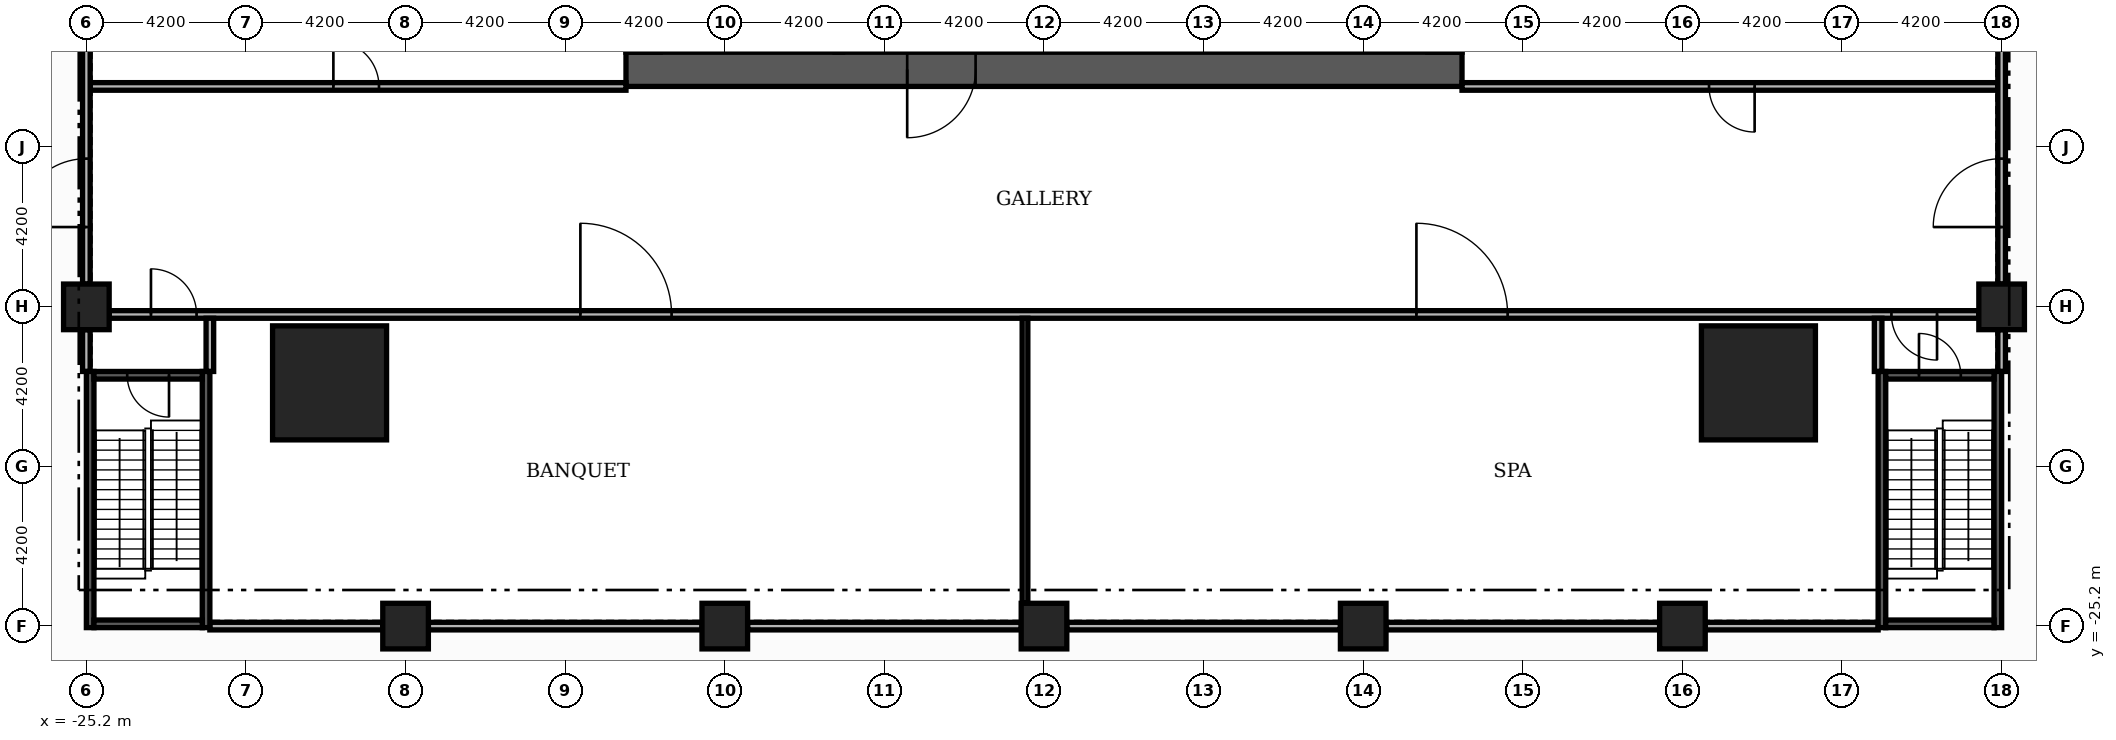
"""IFC4 building model, lengths in metres.
Left out: names, types, materials, properties, quantities, classifications, styles, units other than length and angle.
Written with IfcOpenShell. Run it as: python <this file> out.ifc"""

import sys

from ifc_helpers import new_model, si_unit, direction, frame, frame_2d, origin, origin_2d, place, context, subcontext, project, spatial, rectangle, extrude, element, fill, save


model = new_model("IFC4")
c1 = context("Model", 3, precision=1e-05, world=origin(), true_north=direction((0.0, 1.0)))
c2 = subcontext(c1, "Body", "Model", "MODEL_VIEW")
j1 = project(units=[si_unit("LENGTHUNIT", "METRE"), si_unit("PLANEANGLEUNIT", "RADIAN")], contexts=[c1])
p1 = place(None, origin())
s1 = spatial("IfcSite", under=j1, at=p1, CompositionType="ELEMENT")
p2 = place(p1, origin())
s2 = spatial("IfcBuilding", under=s1, at=p2, CompositionType="ELEMENT")
p3 = place(p2, frame((0.0, 0.0, 16.8)))
s3 = spatial("IfcBuildingStorey", under=s2, at=p3, CompositionType="ELEMENT", Elevation=16.8)
p4 = place(p3, frame((-11.0, -10.55, 0.0), z_axis=(0.0, 0.0, 1.0), x_axis=(1.0, 0.0, 0.0)))
e1 = element("IfcWall", 1, at=p4, inside=s3, PredefinedType="SHEAR", context=c2, shape_type="SweptSolid", body=[
    extrude(rectangle(XDim=22.0, YDim=0.9, at=frame_2d((11.0, 0.0))), origin(), (0.0, 0.0, 1.0), 4.98),
])
p5 = place(p4, frame((7.4, 0.0, 0.0)))
e2 = element("IfcOpeningElement", 2, at=p5, cuts=e1, PredefinedType="OPENING", context=c2, shape_type="SweptSolid", body=[
    extrude(rectangle(XDim=1.8, YDim=2.2, at=frame_2d((0.9, 1.1))), frame((0.0, 0.46, 0.0), z_axis=(0.0, -1.0, 0.0), x_axis=(1.0, 0.0, 0.0)), (0.0, 0.0, 1.0), 0.92),
])
for number, where, z_axis, x_axis in (
    (3, (18.8, -18.8, 0.0), (0.0, 0.0, 1.0), (1.0, 0.0, 0.0)),
    (4, (-18.8, -18.8, 0.0), (0.0, 0.0, 1.0), (1.0, 0.0, 0.0)),
):
    element("IfcColumn", number, at=place(p3, frame(where, z_axis=z_axis, x_axis=x_axis)), inside=s3, PredefinedType="COLUMN", context=c2, shape_type="SweptSolid", body=[
        extrude(rectangle(XDim=3.0, YDim=3.0, at=origin_2d()), origin(), (0.0, 0.0, 1.0), 5.4),
    ])
for number, where, z_axis, x_axis in (
    (5, (25.2, -16.8, 0.0), (0.0, 0.0, 1.0), (1.0, 0.0, 0.0)),
    (6, (0.0, -25.2, 0.0), (0.0, 0.0, 1.0), (1.0, 0.0, 0.0)),
    (7, (8.4, -25.2, 0.0), (0.0, 0.0, 1.0), (1.0, 0.0, 0.0)),
    (8, (16.8, -25.2, 0.0), (0.0, 0.0, 1.0), (1.0, 0.0, 0.0)),
    (9, (-8.4, -25.2, 0.0), (0.0, 0.0, 1.0), (1.0, 0.0, 0.0)),
    (10, (-16.8, -25.2, 0.0), (0.0, 0.0, 1.0), (1.0, 0.0, 0.0)),
    (11, (-25.2, -16.8, 0.0), (0.0, 0.0, 1.0), (1.0, 0.0, 0.0)),
):
    element("IfcColumn", number, at=place(p3, frame(where, z_axis=z_axis, x_axis=x_axis)), inside=s3, PredefinedType="COLUMN", context=c2, shape_type="SweptSolid", body=[
        extrude(rectangle(XDim=1.2, YDim=1.2, at=origin_2d()), origin(), (0.0, 0.0, 1.0), 5.4),
    ])
p6 = place(p3, frame((-21.95, -25.2, 0.0), z_axis=(0.0, 0.0, 1.0), x_axis=(1.0, 0.0, 0.0)))
e12 = element("IfcWall", 12, at=p6, inside=s3, PredefinedType="PARTITIONING", context=c2, shape_type="SweptSolid", body=[
    extrude(rectangle(XDim=4.55, YDim=0.2, at=frame_2d((2.275, 0.0))), origin(), (0.0, 0.0, 1.0), 4.78),
])
for number, where, z_axis, x_axis in (
    (13, (-16.2, -25.2, 0.0), (0.0, 0.0, 1.0), (1.0, 0.0, 0.0)),
    (14, (-7.8, -25.2, 0.0), (0.0, 0.0, 1.0), (1.0, 0.0, 0.0)),
    (15, (0.6, -25.2, 0.0), (0.0, 0.0, 1.0), (1.0, 0.0, 0.0)),
    (16, (9.0, -25.2, 0.0), (0.0, 0.0, 1.0), (1.0, 0.0, 0.0)),
):
    element("IfcWall", number, at=place(p3, frame(where, z_axis=z_axis, x_axis=x_axis)), inside=s3, PredefinedType="PARTITIONING", context=c2, shape_type="SweptSolid", body=[
        extrude(rectangle(XDim=7.2, YDim=0.2, at=frame_2d((3.6, 0.0))), origin(), (0.0, 0.0, 1.0), 4.78),
    ])
p7 = place(p3, frame((17.4, -25.2, 0.0), z_axis=(0.0, 0.0, 1.0), x_axis=(1.0, 0.0, 0.0)))
e17 = element("IfcWall", 17, at=p7, inside=s3, PredefinedType="PARTITIONING", context=c2, shape_type="SweptSolid", body=[
    extrude(rectangle(XDim=4.55, YDim=0.2, at=frame_2d((2.275, 0.0))), origin(), (0.0, 0.0, 1.0), 4.78),
])
p8 = place(p3, frame((-24.6, -17.0, 0.0), z_axis=(0.0, 0.0, 1.0), x_axis=(1.0, 0.0, 0.0)))
e18 = element("IfcWall", 18, at=p8, inside=s3, PredefinedType="PARTITIONING", context=c2, shape_type="SweptSolid", body=[
    extrude(rectangle(XDim=49.2, YDim=0.2, at=frame_2d((24.6, 0.0))), origin(), (0.0, 0.0, 1.0), 4.98),
])
p9 = place(p8, frame((1.1, 0.0, 0.0)))
e19 = element("IfcOpeningElement", 19, at=p9, cuts=e18, PredefinedType="OPENING", context=c2, shape_type="SweptSolid", body=[
    extrude(rectangle(XDim=1.2, YDim=2.2, at=frame_2d((0.6, 1.1))), frame((0.0, 0.11, 0.0), z_axis=(0.0, -1.0, 0.0), x_axis=(1.0, 0.0, 0.0)), (0.0, 0.0, 1.0), 0.22),
])
p10 = place(p8, frame((12.4, 0.0, 0.0)))
e20 = element("IfcOpeningElement", 20, at=p10, cuts=e18, PredefinedType="OPENING", context=c2, shape_type="SweptSolid", body=[
    extrude(rectangle(XDim=2.4, YDim=2.4, at=frame_2d((1.2, 1.2))), frame((0.0, 0.11, 0.0), z_axis=(0.0, -1.0, 0.0), x_axis=(1.0, 0.0, 0.0)), (0.0, 0.0, 1.0), 0.22),
])
p11 = place(p8, frame((34.4, 0.0, 0.0)))
e21 = element("IfcOpeningElement", 21, at=p11, cuts=e18, PredefinedType="OPENING", context=c2, shape_type="SweptSolid", body=[
    extrude(rectangle(XDim=2.4, YDim=2.4, at=frame_2d((1.2, 1.2))), frame((0.0, 0.11, 0.0), z_axis=(0.0, -1.0, 0.0), x_axis=(1.0, 0.0, 0.0)), (0.0, 0.0, 1.0), 0.22),
])
p12 = place(p8, frame((46.9, 0.0, 0.0)))
e22 = element("IfcOpeningElement", 22, at=p12, cuts=e18, PredefinedType="OPENING", context=c2, shape_type="SweptSolid", body=[
    extrude(rectangle(XDim=1.2, YDim=2.2, at=frame_2d((0.6, 1.1))), frame((0.0, 0.11, 0.0), z_axis=(0.0, -1.0, 0.0), x_axis=(1.0, 0.0, 0.0)), (0.0, 0.0, 1.0), 0.22),
])
p13 = place(p3, frame((-25.1, -11.0, 0.0), z_axis=(0.0, 0.0, 1.0), x_axis=(1.0, 0.0, 0.0)))
e23 = element("IfcWall", 23, at=p13, inside=s3, PredefinedType="PARTITIONING", context=c2, shape_type="SweptSolid", body=[
    extrude(rectangle(XDim=14.1, YDim=0.2, at=frame_2d((7.05, 0.0))), origin(), (0.0, 0.0, 1.0), 4.98),
])
p14 = place(p13, frame((6.4, 0.0, 0.0)))
e24 = element("IfcOpeningElement", 24, at=p14, cuts=e23, PredefinedType="OPENING", context=c2, shape_type="SweptSolid", body=[
    extrude(rectangle(XDim=1.2, YDim=2.2, at=frame_2d((0.6, 1.1))), frame((0.0, 0.11, 0.0), z_axis=(0.0, -1.0, 0.0), x_axis=(1.0, 0.0, 0.0)), (0.0, 0.0, 1.0), 0.22),
])
p15 = place(p3, frame((11.0, -11.0, 0.0), z_axis=(0.0, 0.0, 1.0), x_axis=(1.0, 0.0, 0.0)))
e25 = element("IfcWall", 25, at=p15, inside=s3, PredefinedType="PARTITIONING", context=c2, shape_type="SweptSolid", body=[
    extrude(rectangle(XDim=14.1, YDim=0.2, at=frame_2d((7.05, 0.0))), origin(), (0.0, 0.0, 1.0), 4.98),
])
p16 = place(p15, frame((6.5, 0.0, 0.0)))
e26 = element("IfcOpeningElement", 26, at=p16, cuts=e25, PredefinedType="OPENING", context=c2, shape_type="SweptSolid", body=[
    extrude(rectangle(XDim=1.2, YDim=2.2, at=frame_2d((0.6, 1.1))), frame((0.0, 0.11, 0.0), z_axis=(0.0, -1.0, 0.0), x_axis=(1.0, 0.0, 0.0)), (0.0, 0.0, 1.0), 0.22),
])
p17 = place(p3, frame((-25.2, -18.5, 0.0), z_axis=(0.0, 0.0, 1.0), x_axis=(0.0, 1.0, 0.0)))
e27 = element("IfcWall", 27, at=p17, inside=s3, PredefinedType="PARTITIONING", context=c2, shape_type="SweptSolid", body=[
    extrude(rectangle(XDim=1.1, YDim=0.2, at=frame_2d((0.55, 0.0))), origin(), (0.0, 0.0, 1.0), 4.68),
])
p18 = place(p3, frame((-25.2, -16.2, 0.0), z_axis=(0.0, 0.0, 1.0), x_axis=(0.0, 1.0, 0.0)))
e28 = element("IfcWall", 28, at=p18, inside=s3, PredefinedType="PARTITIONING", context=c2, shape_type="SweptSolid", body=[
    extrude(rectangle(XDim=7.2, YDim=0.2, at=frame_2d((3.6, 0.0))), origin(), (0.0, 0.0, 1.0), 4.68),
])
p19 = place(p18, frame((1.5, 0.0, 0.0)))
e29 = element("IfcOpeningElement", 29, at=p19, cuts=e28, PredefinedType="OPENING", context=c2, shape_type="SweptSolid", body=[
    extrude(rectangle(XDim=1.8, YDim=2.2, at=frame_2d((0.9, 1.1))), frame((0.0, 0.11, 0.0), z_axis=(0.0, -1.0, 0.0), x_axis=(1.0, 0.0, 0.0)), (0.0, 0.0, 1.0), 0.22),
])
p20 = place(p3, frame((-21.95, -18.5, 0.0), z_axis=(0.0, 0.0, 1.0), x_axis=(0.0, 1.0, 0.0)))
e30 = element("IfcWall", 30, at=p20, inside=s3, PredefinedType="PARTITIONING", context=c2, shape_type="SweptSolid", body=[
    extrude(rectangle(XDim=1.4, YDim=0.2, at=frame_2d((0.7, 0.0))), origin(), (0.0, 0.0, 1.0), 4.98),
])
p21 = place(p3, frame((-0.5, -24.6, 0.0), z_axis=(0.0, 0.0, 1.0), x_axis=(0.0, 1.0, 0.0)))
e31 = element("IfcWall", 31, at=p21, inside=s3, PredefinedType="PARTITIONING", context=c2, shape_type="SweptSolid", body=[
    extrude(rectangle(XDim=7.5, YDim=0.15, at=frame_2d((3.75, 0.0))), origin(), (0.0, 0.0, 1.0), 4.98),
])
p22 = place(p3, frame((21.95, -18.5, 0.0), z_axis=(0.0, 0.0, 1.0), x_axis=(0.0, 1.0, 0.0)))
e32 = element("IfcWall", 32, at=p22, inside=s3, PredefinedType="PARTITIONING", context=c2, shape_type="SweptSolid", body=[
    extrude(rectangle(XDim=1.4, YDim=0.2, at=frame_2d((0.7, 0.0))), origin(), (0.0, 0.0, 1.0), 4.98),
])
p23 = place(p3, frame((25.2, -18.5, 0.0), z_axis=(0.0, 0.0, 1.0), x_axis=(0.0, 1.0, 0.0)))
e33 = element("IfcWall", 33, at=p23, inside=s3, PredefinedType="PARTITIONING", context=c2, shape_type="SweptSolid", body=[
    extrude(rectangle(XDim=1.1, YDim=0.2, at=frame_2d((0.55, 0.0))), origin(), (0.0, 0.0, 1.0), 4.68),
])
p24 = place(p3, frame((25.2, -16.2, 0.0), z_axis=(0.0, 0.0, 1.0), x_axis=(0.0, 1.0, 0.0)))
e34 = element("IfcWall", 34, at=p24, inside=s3, PredefinedType="PARTITIONING", context=c2, shape_type="SweptSolid", body=[
    extrude(rectangle(XDim=7.2, YDim=0.2, at=frame_2d((3.6, 0.0))), origin(), (0.0, 0.0, 1.0), 4.68),
])
p25 = place(p24, frame((1.5, 0.0, 0.0)))
e35 = element("IfcOpeningElement", 35, at=p25, cuts=e34, PredefinedType="OPENING", context=c2, shape_type="SweptSolid", body=[
    extrude(rectangle(XDim=1.8, YDim=2.2, at=frame_2d((0.9, 1.1))), frame((0.0, 0.11, 0.0), z_axis=(0.0, -1.0, 0.0), x_axis=(1.0, 0.0, 0.0)), (0.0, 0.0, 1.0), 0.22),
])
p26 = place(p3, frame((22.05, -25.24, 0.0), z_axis=(0.0, 0.0, 1.0), x_axis=(0.0, 1.0, 0.0)))
e36 = element("IfcWall", 36, at=p26, inside=s3, PredefinedType="SOLIDWALL", context=c2, shape_type="SweptSolid", body=[
    extrude(rectangle(XDim=6.74, YDim=0.2, at=frame_2d((3.37, 0.0))), origin(), (0.0, 0.0, 1.0), 4.98),
])
p27 = place(p3, frame((25.1, -25.24, 0.0), z_axis=(0.0, 0.0, 1.0), x_axis=(0.0, 1.0, 0.0)))
e37 = element("IfcWall", 37, at=p27, inside=s3, PredefinedType="SOLIDWALL", context=c2, shape_type="SweptSolid", body=[
    extrude(rectangle(XDim=6.74, YDim=0.2, at=frame_2d((3.37, 0.0))), origin(), (0.0, 0.0, 1.0), 4.68),
])
p28 = place(p3, frame((22.15, -25.14, 0.0), z_axis=(0.0, 0.0, 1.0), x_axis=(1.0, 0.0, 0.0)))
e38 = element("IfcWall", 38, at=p28, inside=s3, PredefinedType="SOLIDWALL", context=c2, shape_type="SweptSolid", body=[
    extrude(rectangle(XDim=2.85, YDim=0.2, at=frame_2d((1.425, 0.0))), origin(), (0.0, 0.0, 1.0), 4.78),
])
p29 = place(p3, frame((22.15, -18.6, 0.0), z_axis=(0.0, 0.0, 1.0), x_axis=(1.0, 0.0, 0.0)))
e39 = element("IfcWall", 39, at=p29, inside=s3, PredefinedType="SOLIDWALL", context=c2, shape_type="SweptSolid", body=[
    extrude(rectangle(XDim=2.85, YDim=0.2, at=frame_2d((1.425, 0.0))), origin(), (0.0, 0.0, 1.0), 4.98),
])
p30 = place(p29, frame((0.875, 0.0, 0.0)))
e40 = element("IfcOpeningElement", 40, at=p30, cuts=e39, PredefinedType="OPENING", context=c2, shape_type="SweptSolid", body=[
    extrude(rectangle(XDim=1.1, YDim=2.2, at=frame_2d((0.55, 1.1))), frame((0.0, 0.11, 0.0), z_axis=(0.0, -1.0, 0.0), x_axis=(1.0, 0.0, 0.0)), (0.0, 0.0, 1.0), 0.22),
])
p31 = place(p3, frame((-25.1, -25.24, 0.0), z_axis=(0.0, 0.0, 1.0), x_axis=(0.0, 1.0, 0.0)))
e41 = element("IfcWall", 41, at=p31, inside=s3, PredefinedType="SOLIDWALL", context=c2, shape_type="SweptSolid", body=[
    extrude(rectangle(XDim=6.74, YDim=0.2, at=frame_2d((3.37, 0.0))), origin(), (0.0, 0.0, 1.0), 4.68),
])
p32 = place(p3, frame((-22.05, -25.24, 0.0), z_axis=(0.0, 0.0, 1.0), x_axis=(0.0, 1.0, 0.0)))
e42 = element("IfcWall", 42, at=p32, inside=s3, PredefinedType="SOLIDWALL", context=c2, shape_type="SweptSolid", body=[
    extrude(rectangle(XDim=6.74, YDim=0.2, at=frame_2d((3.37, 0.0))), origin(), (0.0, 0.0, 1.0), 4.98),
])
p33 = place(p3, frame((-25.0, -25.14, 0.0), z_axis=(0.0, 0.0, 1.0), x_axis=(1.0, 0.0, 0.0)))
e43 = element("IfcWall", 43, at=p33, inside=s3, PredefinedType="SOLIDWALL", context=c2, shape_type="SweptSolid", body=[
    extrude(rectangle(XDim=2.85, YDim=0.2, at=frame_2d((1.425, 0.0))), origin(), (0.0, 0.0, 1.0), 4.78),
])
p34 = place(p3, frame((-25.0, -18.6, 0.0), z_axis=(0.0, 0.0, 1.0), x_axis=(1.0, 0.0, 0.0)))
e44 = element("IfcWall", 44, at=p34, inside=s3, PredefinedType="SOLIDWALL", context=c2, shape_type="SweptSolid", body=[
    extrude(rectangle(XDim=2.85, YDim=0.2, at=frame_2d((1.425, 0.0))), origin(), (0.0, 0.0, 1.0), 4.98),
])
p35 = place(p34, frame((0.875, 0.0, 0.0)))
e45 = element("IfcOpeningElement", 45, at=p35, cuts=e44, PredefinedType="OPENING", context=c2, shape_type="SweptSolid", body=[
    extrude(rectangle(XDim=1.1, YDim=2.2, at=frame_2d((0.55, 1.1))), frame((0.0, 0.11, 0.0), z_axis=(0.0, -1.0, 0.0), x_axis=(1.0, 0.0, 0.0)), (0.0, 0.0, 1.0), 0.22),
])
p36 = place(p5, frame((1.8, 0.0, 0.0), z_axis=(0.0, 0.0, 1.0), x_axis=(-1.0, 0.0, 0.0)))
e46 = element("IfcDoor", 46, at=p36, inside=s3, OperationType="DOUBLE_DOOR_SINGLE_SWING", PredefinedType="DOOR", context=c2, shape_type="SweptSolid", body=[
    extrude(rectangle(XDim=1.8, YDim=2.2, at=frame_2d((0.9, 1.1))), frame((0.0, 0.025, 0.0), z_axis=(0.0, -1.0, 0.0), x_axis=(1.0, 0.0, 0.0)), (0.0, 0.0, 1.0), 0.05),
])
fill(e2, e46)
p37 = place(p9, origin())
e47 = element("IfcDoor", 47, at=p37, inside=s3, OperationType="SINGLE_SWING_LEFT", PredefinedType="DOOR", context=c2, shape_type="SweptSolid", body=[
    extrude(rectangle(XDim=1.2, YDim=2.2, at=frame_2d((0.6, 1.1))), frame((0.0, 0.025, 0.0), z_axis=(0.0, -1.0, 0.0), x_axis=(1.0, 0.0, 0.0)), (0.0, 0.0, 1.0), 0.05),
])
fill(e19, e47)
p38 = place(p10, origin())
e48 = element("IfcDoor", 48, at=p38, inside=s3, OperationType="DOUBLE_DOOR_SINGLE_SWING", PredefinedType="DOOR", context=c2, shape_type="SweptSolid", body=[
    extrude(rectangle(XDim=2.4, YDim=2.4, at=frame_2d((1.2, 1.2))), frame((0.0, 0.025, 0.0), z_axis=(0.0, -1.0, 0.0), x_axis=(1.0, 0.0, 0.0)), (0.0, 0.0, 1.0), 0.05),
])
fill(e20, e48)
p39 = place(p11, origin())
e49 = element("IfcDoor", 49, at=p39, inside=s3, OperationType="DOUBLE_DOOR_SINGLE_SWING", PredefinedType="DOOR", context=c2, shape_type="SweptSolid", body=[
    extrude(rectangle(XDim=2.4, YDim=2.4, at=frame_2d((1.2, 1.2))), frame((0.0, 0.025, 0.0), z_axis=(0.0, -1.0, 0.0), x_axis=(1.0, 0.0, 0.0)), (0.0, 0.0, 1.0), 0.05),
])
fill(e21, e49)
p40 = place(p12, origin())
e50 = element("IfcDoor", 50, at=p40, inside=s3, OperationType="SINGLE_SWING_RIGHT", PredefinedType="DOOR", context=c2, shape_type="SweptSolid", body=[
    extrude(rectangle(XDim=1.2, YDim=2.2, at=frame_2d((0.6, 1.1))), frame((0.0, 0.025, 0.0), z_axis=(0.0, -1.0, 0.0), x_axis=(1.0, 0.0, 0.0)), (0.0, 0.0, 1.0), 0.05),
])
fill(e22, e50)
p41 = place(p19, origin())
e51 = element("IfcDoor", 51, at=p41, inside=s3, OperationType="DOUBLE_DOOR_SINGLE_SWING", PredefinedType="DOOR", context=c2, shape_type="SweptSolid", body=[
    extrude(rectangle(XDim=1.8, YDim=2.2, at=frame_2d((0.9, 1.1))), frame((0.0, 0.025, 0.0), z_axis=(0.0, -1.0, 0.0), x_axis=(1.0, 0.0, 0.0)), (0.0, 0.0, 1.0), 0.05),
])
fill(e29, e51)
p42 = place(p25, origin())
e52 = element("IfcDoor", 52, at=p42, inside=s3, OperationType="DOUBLE_DOOR_SINGLE_SWING", PredefinedType="DOOR", context=c2, shape_type="SweptSolid", body=[
    extrude(rectangle(XDim=1.8, YDim=2.2, at=frame_2d((0.9, 1.1))), frame((0.0, 0.025, 0.0), z_axis=(0.0, -1.0, 0.0), x_axis=(1.0, 0.0, 0.0)), (0.0, 0.0, 1.0), 0.05),
])
fill(e35, e52)
p43 = place(p14, origin())
e53 = element("IfcDoor", 53, at=p43, inside=s3, OperationType="SINGLE_SWING_LEFT", PredefinedType="DOOR", context=c2, shape_type="SweptSolid", body=[
    extrude(rectangle(XDim=1.2, YDim=2.2, at=frame_2d((0.6, 1.1))), frame((0.0, 0.025, 0.0), z_axis=(0.0, -1.0, 0.0), x_axis=(1.0, 0.0, 0.0)), (0.0, 0.0, 1.0), 0.05),
])
fill(e24, e53)
p44 = place(p16, origin())
e54 = element("IfcDoor", 54, at=p44, inside=s3, OperationType="SINGLE_SWING_RIGHT", PredefinedType="DOOR", context=c2, shape_type="SweptSolid", body=[
    extrude(rectangle(XDim=1.2, YDim=2.2, at=frame_2d((0.6, 1.1))), frame((0.0, 0.025, 0.0), z_axis=(0.0, -1.0, 0.0), x_axis=(1.0, 0.0, 0.0)), (0.0, 0.0, 1.0), 0.05),
])
fill(e26, e54)
p45 = place(p30, origin())
e55 = element("IfcDoor", 55, at=p45, inside=s3, OperationType="SINGLE_SWING_LEFT", PredefinedType="DOOR", context=c2, shape_type="SweptSolid", body=[
    extrude(rectangle(XDim=1.1, YDim=2.2, at=frame_2d((0.55, 1.1))), frame((0.0, 0.025, 0.0), z_axis=(0.0, -1.0, 0.0), x_axis=(1.0, 0.0, 0.0)), (0.0, 0.0, 1.0), 0.05),
])
fill(e40, e55)
p46 = place(p35, origin())
e56 = element("IfcDoor", 56, at=p46, inside=s3, OperationType="SINGLE_SWING_RIGHT", PredefinedType="DOOR", context=c2, shape_type="SweptSolid", body=[
    extrude(rectangle(XDim=1.1, YDim=2.2, at=frame_2d((0.55, 1.1))), frame((0.0, 0.025, 0.0), z_axis=(0.0, -1.0, 0.0), x_axis=(1.0, 0.0, 0.0)), (0.0, 0.0, 1.0), 0.05),
])
fill(e45, e56)
save(model, sys.argv[1])
